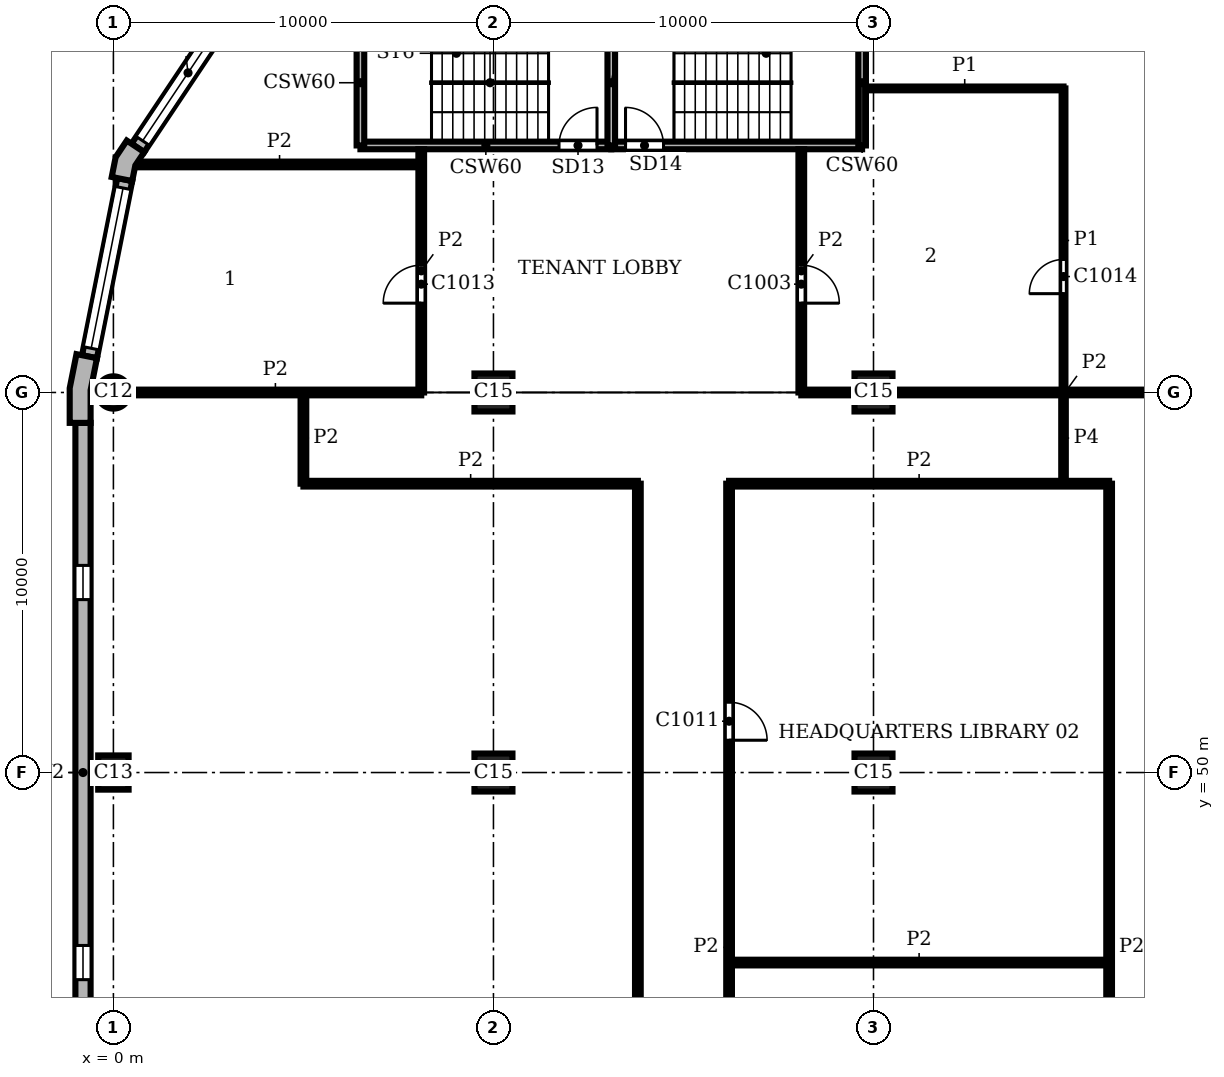
"""IFC4 building model, lengths in metres.
Left out: names, types, materials, properties, quantities, classifications, styles, units other than length and angle.
Written with IfcOpenShell. Run it as: python <this file> out.ifc"""

import sys

from ifc_helpers import new_model, si_unit, direction, frame, frame_2d, origin, origin_2d, place, context, subcontext, project, spatial, polyline, rectangle, circle, outline, extrude, element, fill, save


model = new_model("IFC4")
c1 = context("Model", 3, precision=1e-05, world=origin(), true_north=direction((0.0, 1.0)))
c2 = subcontext(c1, "Body", "Model", "MODEL_VIEW")
j1 = project(units=[si_unit("LENGTHUNIT", "METRE"), si_unit("PLANEANGLEUNIT", "RADIAN")], contexts=[c1])
p1 = place(None, origin())
s1 = spatial("IfcSite", under=j1, at=p1, CompositionType="ELEMENT")
p2 = place(p1, origin())
s2 = spatial("IfcBuilding", under=s1, at=p2, CompositionType="ELEMENT")
p3 = place(p2, frame((0.0, 0.0, 348.9)))
s3 = spatial("IfcBuildingStorey", under=s2, at=p3, CompositionType="ELEMENT", Elevation=348.9)
p4 = place(p3, frame((0.0, 60.0, 0.0), z_axis=(0.0, 0.0, 1.0), x_axis=(1.0, 0.0, 0.0)))
e1 = element("IfcColumn", 1, at=p4, inside=s3, PredefinedType="COLUMN", context=c2, shape_type="SweptSolid", body=[
    extrude(circle(Radius=0.425, at=origin_2d()), origin(), (0.0, 0.0, 1.0), 3.9),
])
p5 = place(p3, frame((0.0, 50.0, 0.0), z_axis=(0.0, 0.0, 1.0), x_axis=(0.0, 1.0, 0.0)))
e2 = element("IfcColumn", 2, at=p5, inside=s3, PredefinedType="COLUMN", context=c2, shape_type="SweptSolid", body=[
    extrude(rectangle(XDim=0.9, YDim=0.8, at=origin_2d()), origin(), (0.0, 0.0, 1.0), 3.9),
])
for number, where, z_axis, x_axis in (
    (3, (10.0, 50.0, 0.0), (0.0, 0.0, 1.0), (1.0, 0.0, 0.0)),
    (4, (10.0, 60.0, 0.0), (0.0, 0.0, 1.0), (1.0, 0.0, 0.0)),
    (5, (20.0, 50.0, 0.0), (0.0, 0.0, 1.0), (1.0, 0.0, 0.0)),
    (6, (20.0, 60.0, 0.0), (0.0, 0.0, 1.0), (1.0, 0.0, 0.0)),
):
    element("IfcColumn", number, at=place(p3, frame(where, z_axis=z_axis, x_axis=x_axis)), inside=s3, PredefinedType="COLUMN", context=c2, shape_type="SweptSolid", body=[
        extrude(rectangle(XDim=1.0, YDim=1.0, at=origin_2d()), origin(), (0.0, 0.0, 1.0), 3.9),
    ])
p6 = place(p3, origin())
e7 = element("IfcWall", 7, at=p6, inside=s3, PredefinedType="SOLIDWALL", context=c2, shape_type="SweptSolid", body=[
    extrude(outline(polyline([(0.477, 66.545), (0.352, 66.629), (0.059, 66.189), (-0.045, 65.67), (0.103, 65.641), (0.495, 65.563), (0.577, 65.974), (0.81, 66.323), (0.477, 66.545)])), origin(), (0.0, 0.0, 1.0), 3.9),
])
e8 = element("IfcWall", 8, at=p6, inside=s3, PredefinedType="SOLIDWALL", context=c2, shape_type="SweptSolid", body=[
    extrude(outline(polyline([(-0.825, 60.98), (-0.972, 61.009), (-1.15, 60.113), (-1.15, 59.2), (-1.0, 59.2), (-0.6, 59.2), (-0.6, 60.059), (-0.432, 60.902), (-0.825, 60.98)])), origin(), (0.0, 0.0, 1.0), 3.9),
])
p7 = place(p3, frame((29.357, 66.434, 0.0), z_axis=(0.0, 0.0, 1.0), x_axis=(-0.555541552266, 0.831488775454, 0.0)))
e9 = element("IfcWall", 9, at=p7, inside=s3, PredefinedType="SOLIDWALL", context=c2, shape_type="SweptSolid", body=[
    extrude(rectangle(XDim=4.753, YDim=0.4, at=frame_2d((2.376, 0.0))), origin(), (0.0, 0.0, 1.0), 3.9),
])
p8 = place(p7, frame((0.226, 0.0, 0.9)))
e10 = element("IfcOpeningElement", 10, at=p8, cuts=e9, PredefinedType="OPENING", context=c2, shape_type="SweptSolid", body=[
    extrude(rectangle(XDim=4.3, YDim=2.35, at=frame_2d((2.15, 1.175))), frame((0.0, 0.21, 0.0), z_axis=(0.0, -1.0, 0.0), x_axis=(1.0, 0.0, 0.0)), (0.0, 0.0, 1.0), 0.42),
])
p9 = place(p3, frame((3.284, 70.386, 0.0), z_axis=(0.0, 0.0, 1.0), x_axis=(-0.555541552266, -0.831488775454, 0.0)))
e11 = element("IfcWall", 11, at=p9, inside=s3, PredefinedType="SOLIDWALL", context=c2, shape_type="SweptSolid", body=[
    extrude(rectangle(XDim=4.753, YDim=0.4, at=frame_2d((2.376, 0.0))), origin(), (0.0, 0.0, 1.0), 3.9),
])
p10 = place(p9, frame((0.226, 0.0, 0.9)))
e12 = element("IfcOpeningElement", 12, at=p10, cuts=e11, PredefinedType="OPENING", context=c2, shape_type="SweptSolid", body=[
    extrude(rectangle(XDim=4.3, YDim=2.35, at=frame_2d((2.15, 1.175))), frame((0.0, 0.21, 0.0), z_axis=(0.0, -1.0, 0.0), x_axis=(1.0, 0.0, 0.0)), (0.0, 0.0, 1.0), 0.42),
])
p11 = place(p3, frame((0.299, 65.602, 0.0), z_axis=(0.0, 0.0, 1.0), x_axis=(-0.195098533057, -0.98078364709, 0.0)))
e13 = element("IfcWall", 13, at=p11, inside=s3, PredefinedType="SOLIDWALL", context=c2, shape_type="SweptSolid", body=[
    extrude(rectangle(XDim=4.753, YDim=0.4, at=frame_2d((2.376, 0.0))), origin(), (0.0, 0.0, 1.0), 3.9),
])
p12 = place(p11, frame((0.226, 0.0, 0.9)))
e14 = element("IfcOpeningElement", 14, at=p12, cuts=e13, PredefinedType="OPENING", context=c2, shape_type="SweptSolid", body=[
    extrude(rectangle(XDim=4.3, YDim=2.35, at=frame_2d((2.15, 1.175))), frame((0.0, 0.21, 0.0), z_axis=(0.0, -1.0, 0.0), x_axis=(1.0, 0.0, 0.0)), (0.0, 0.0, 1.0), 0.42),
])
p13 = place(p3, frame((-0.8, 59.2, 0.0), z_axis=(0.0, 0.0, 1.0), x_axis=(0.0, -1.0, 0.0)))
e15 = element("IfcWall", 15, at=p13, inside=s3, PredefinedType="SOLIDWALL", context=c2, shape_type="SweptSolid", body=[
    extrude(rectangle(XDim=18.4, YDim=0.4, at=frame_2d((9.2, 0.0))), origin(), (0.0, 0.0, 1.0), 3.9),
])
p14 = place(p13, frame((3.75, 0.0, 0.9)))
e16 = element("IfcOpeningElement", 16, at=p14, cuts=e15, PredefinedType="OPENING", context=c2, shape_type="SweptSolid", body=[
    extrude(rectangle(XDim=0.9, YDim=2.35, at=frame_2d((0.45, 1.175))), frame((0.0, 0.21, 0.0), z_axis=(0.0, -1.0, 0.0), x_axis=(1.0, 0.0, 0.0)), (0.0, 0.0, 1.0), 0.42),
])
p15 = place(p13, frame((13.75, 0.0, 0.9)))
e17 = element("IfcOpeningElement", 17, at=p15, cuts=e15, PredefinedType="OPENING", context=c2, shape_type="SweptSolid", body=[
    extrude(rectangle(XDim=0.9, YDim=2.35, at=frame_2d((0.45, 1.175))), frame((0.0, 0.21, 0.0), z_axis=(0.0, -1.0, 0.0), x_axis=(1.0, 0.0, 0.0)), (0.0, 0.0, 1.0), 0.42),
])
p16 = place(p3, frame((6.5, 66.5, 0.0), z_axis=(0.0, 0.0, 1.0), x_axis=(1.0, 0.0, 0.0)))
e18 = element("IfcWall", 18, at=p16, inside=s3, PredefinedType="SHEAR", context=c2, shape_type="SweptSolid", body=[
    extrude(rectangle(XDim=6.6, YDim=0.2, at=frame_2d((3.3, 0.0))), origin(), (0.0, 0.0, 1.0), 3.45),
])
p17 = place(p16, frame((5.225, 0.0, 0.0)))
e19 = element("IfcOpeningElement", 19, at=p17, cuts=e18, PredefinedType="OPENING", context=c2, shape_type="SweptSolid", body=[
    extrude(rectangle(XDim=1.0, YDim=2.1, at=frame_2d((0.5, 1.05))), frame((0.0, 0.11, 0.0), z_axis=(0.0, -1.0, 0.0), x_axis=(1.0, 0.0, 0.0)), (0.0, 0.0, 1.0), 0.22),
])
p18 = place(p3, frame((13.1, 66.5, 0.0), z_axis=(0.0, 0.0, 1.0), x_axis=(1.0, 0.0, 0.0)))
e20 = element("IfcWall", 20, at=p18, inside=s3, PredefinedType="SHEAR", context=c2, shape_type="SweptSolid", body=[
    extrude(rectangle(XDim=6.6, YDim=0.2, at=frame_2d((3.3, 0.0))), origin(), (0.0, 0.0, 1.0), 3.45),
])
p19 = place(p18, frame((0.375, 0.0, 0.0)))
e21 = element("IfcOpeningElement", 21, at=p19, cuts=e20, PredefinedType="OPENING", context=c2, shape_type="SweptSolid", body=[
    extrude(rectangle(XDim=1.0, YDim=2.1, at=frame_2d((0.5, 1.05))), frame((0.0, 0.11, 0.0), z_axis=(0.0, -1.0, 0.0), x_axis=(1.0, 0.0, 0.0)), (0.0, 0.0, 1.0), 0.22),
])
for number, where, z_axis, x_axis in (
    (22, (6.5, 66.5, 0.0), (0.0, 0.0, 1.0), (0.0, 1.0, 0.0)),
    (23, (13.1, 66.5, 0.0), (0.0, 0.0, 1.0), (0.0, 1.0, 0.0)),
    (24, (19.7, 66.5, 0.0), (0.0, 0.0, 1.0), (0.0, 1.0, 0.0)),
):
    element("IfcWall", number, at=place(p3, frame(where, z_axis=z_axis, x_axis=x_axis)), inside=s3, PredefinedType="SHEAR", context=c2, shape_type="SweptSolid", body=[
        extrude(rectangle(XDim=3.3, YDim=0.2, at=frame_2d((1.65, 0.0))), origin(), (0.0, 0.0, 1.0), 3.45),
    ])
p20 = place(p3, frame((25.0, 60.0, 0.0), z_axis=(0.0, 0.0, 1.0), x_axis=(0.0, 1.0, 0.0)))
e25 = element("IfcWall", 25, at=p20, inside=s3, PredefinedType="PARTITIONING", context=c2, shape_type="SweptSolid", body=[
    extrude(rectangle(XDim=8.0, YDim=0.1, at=frame_2d((4.0, 0.0))), origin(), (0.0, 0.0, 1.0), 3.45),
])
p21 = place(p20, frame((2.6, 0.0, 0.0)))
e26 = element("IfcOpeningElement", 26, at=p21, cuts=e25, PredefinedType="OPENING", context=c2, shape_type="SweptSolid", body=[
    extrude(rectangle(XDim=0.9, YDim=2.1, at=frame_2d((0.45, 1.05))), frame((0.0, 0.06, 0.0), z_axis=(0.0, -1.0, 0.0), x_axis=(1.0, 0.0, 0.0)), (0.0, 0.0, 1.0), 0.12),
])
p22 = place(p3, frame((19.8, 68.0, 0.0), z_axis=(0.0, 0.0, 1.0), x_axis=(1.0, 0.0, 0.0)))
e27 = element("IfcWall", 27, at=p22, inside=s3, PredefinedType="PARTITIONING", context=c2, shape_type="SweptSolid", body=[
    extrude(rectangle(XDim=5.2, YDim=0.1, at=frame_2d((2.6, 0.0))), origin(), (0.0, 0.0, 1.0), 3.45),
])
p23 = place(p3, frame((5.0, 57.6, 0.0), z_axis=(0.0, 0.0, 1.0), x_axis=(0.0, 1.0, 0.0)))
e28 = element("IfcWall", 28, at=p23, inside=s3, PredefinedType="PARTITIONING", context=c2, shape_type="SweptSolid", body=[
    extrude(rectangle(XDim=2.4, YDim=0.15, at=frame_2d((1.2, 0.0))), origin(), (0.0, 0.0, 1.0), 3.45),
])
p24 = place(p3, frame((8.1, 60.0, 0.0), z_axis=(0.0, 0.0, 1.0), x_axis=(0.0, 1.0, 0.0)))
e29 = element("IfcWall", 29, at=p24, inside=s3, PredefinedType="PARTITIONING", context=c2, shape_type="SweptSolid", body=[
    extrude(rectangle(XDim=6.4, YDim=0.15, at=frame_2d((3.2, 0.0))), origin(), (0.0, 0.0, 1.0), 3.45),
])
p25 = place(p24, frame((2.35, 0.0, 0.0)))
e30 = element("IfcOpeningElement", 30, at=p25, cuts=e29, PredefinedType="OPENING", context=c2, shape_type="SweptSolid", body=[
    extrude(rectangle(XDim=1.0, YDim=2.1, at=frame_2d((0.5, 1.05))), frame((0.0, 0.085, 0.0), z_axis=(0.0, -1.0, 0.0), x_axis=(1.0, 0.0, 0.0)), (0.0, 0.0, 1.0), 0.17),
])
p26 = place(p3, frame((13.8, 28.0, 0.0), z_axis=(0.0, 0.0, 1.0), x_axis=(0.0, 1.0, 0.0)))
e31 = element("IfcWall", 31, at=p26, inside=s3, PredefinedType="PARTITIONING", context=c2, shape_type="SweptSolid", body=[
    extrude(rectangle(XDim=29.6, YDim=0.15, at=frame_2d((14.8, 0.0))), origin(), (0.0, 0.0, 1.0), 3.45),
])
p27 = place(p26, frame((13.901, 0.0, 0.0)))
e32 = element("IfcOpeningElement", 32, at=p27, cuts=e31, PredefinedType="OPENING", context=c2, shape_type="SweptSolid", body=[
    extrude(rectangle(XDim=1.8, YDim=2.1, at=frame_2d((0.9, 1.05))), frame((0.0, 0.085, 0.0), z_axis=(0.0, -1.0, 0.0), x_axis=(1.0, 0.0, 0.0)), (0.0, 0.0, 1.0), 0.17),
])
p28 = place(p3, frame((16.2, 33.2, 0.0), z_axis=(0.0, 0.0, 1.0), x_axis=(0.0, 1.0, 0.0)))
e33 = element("IfcWall", 33, at=p28, inside=s3, PredefinedType="PARTITIONING", context=c2, shape_type="SweptSolid", body=[
    extrude(rectangle(XDim=24.4, YDim=0.15, at=frame_2d((12.2, 0.0))), origin(), (0.0, 0.0, 1.0), 3.45),
])
p29 = place(p28, frame((5.1, 0.0, 0.0)))
e34 = element("IfcOpeningElement", 34, at=p29, cuts=e33, PredefinedType="OPENING", context=c2, shape_type="SweptSolid", body=[
    extrude(rectangle(XDim=1.0, YDim=2.1, at=frame_2d((0.5, 1.05))), frame((0.0, 0.085, 0.0), z_axis=(0.0, -1.0, 0.0), x_axis=(1.0, 0.0, 0.0)), (0.0, 0.0, 1.0), 0.17),
])
p30 = place(p28, frame((17.65, 0.0, 0.0)))
e35 = element("IfcOpeningElement", 35, at=p30, cuts=e33, PredefinedType="OPENING", context=c2, shape_type="SweptSolid", body=[
    extrude(rectangle(XDim=1.0, YDim=2.1, at=frame_2d((0.5, 1.05))), frame((0.0, 0.085, 0.0), z_axis=(0.0, -1.0, 0.0), x_axis=(1.0, 0.0, 0.0)), (0.0, 0.0, 1.0), 0.17),
])
p31 = place(p3, frame((18.1, 60.0, 0.0), z_axis=(0.0, 0.0, 1.0), x_axis=(0.0, 1.0, 0.0)))
e36 = element("IfcWall", 36, at=p31, inside=s3, PredefinedType="PARTITIONING", context=c2, shape_type="SweptSolid", body=[
    extrude(rectangle(XDim=6.4, YDim=0.15, at=frame_2d((3.2, 0.0))), origin(), (0.0, 0.0, 1.0), 3.45),
])
p32 = place(p31, frame((2.35, 0.0, 0.0)))
e37 = element("IfcOpeningElement", 37, at=p32, cuts=e36, PredefinedType="OPENING", context=c2, shape_type="SweptSolid", body=[
    extrude(rectangle(XDim=1.0, YDim=2.1, at=frame_2d((0.5, 1.05))), frame((0.0, 0.085, 0.0), z_axis=(0.0, -1.0, 0.0), x_axis=(1.0, 0.0, 0.0)), (0.0, 0.0, 1.0), 0.17),
])
p33 = place(p3, frame((26.2, 33.2, 0.0), z_axis=(0.0, 0.0, 1.0), x_axis=(0.0, 1.0, 0.0)))
e38 = element("IfcWall", 38, at=p33, inside=s3, PredefinedType="PARTITIONING", context=c2, shape_type="SweptSolid", body=[
    extrude(rectangle(XDim=24.4, YDim=0.15, at=frame_2d((12.2, 0.0))), origin(), (0.0, 0.0, 1.0), 3.45),
])
p34 = place(p3, frame((16.2, 45.0, 0.0), z_axis=(0.0, 0.0, 1.0), x_axis=(1.0, 0.0, 0.0)))
e39 = element("IfcWall", 39, at=p34, inside=s3, PredefinedType="PARTITIONING", context=c2, shape_type="SweptSolid", body=[
    extrude(rectangle(XDim=10.0, YDim=0.15, at=frame_2d((5.0, 0.0))), origin(), (0.0, 0.0, 1.0), 3.45),
])
p35 = place(p3, frame((5.0, 57.6, 0.0), z_axis=(0.0, 0.0, 1.0), x_axis=(1.0, 0.0, 0.0)))
e40 = element("IfcWall", 40, at=p35, inside=s3, PredefinedType="PARTITIONING", context=c2, shape_type="SweptSolid", body=[
    extrude(rectangle(XDim=8.8, YDim=0.15, at=frame_2d((4.4, 0.0))), origin(), (0.0, 0.0, 1.0), 3.45),
])
p36 = place(p3, frame((16.2, 57.6, 0.0), z_axis=(0.0, 0.0, 1.0), x_axis=(1.0, 0.0, 0.0)))
e41 = element("IfcWall", 41, at=p36, inside=s3, PredefinedType="PARTITIONING", context=c2, shape_type="SweptSolid", body=[
    extrude(rectangle(XDim=10.0, YDim=0.15, at=frame_2d((5.0, 0.0))), origin(), (0.0, 0.0, 1.0), 3.45),
])
p37 = place(p3, frame((0.425, 60.0, 0.0), z_axis=(0.0, 0.0, 1.0), x_axis=(1.0, 0.0, 0.0)))
e42 = element("IfcWall", 42, at=p37, inside=s3, PredefinedType="PARTITIONING", context=c2, shape_type="SweptSolid", body=[
    extrude(rectangle(XDim=7.675, YDim=0.15, at=frame_2d((3.837, 0.0))), origin(), (0.0, 0.0, 1.0), 3.45),
])
p38 = place(p3, frame((18.1, 60.0, 0.0), z_axis=(0.0, 0.0, 1.0), x_axis=(1.0, 0.0, 0.0)))
e43 = element("IfcWall", 43, at=p38, inside=s3, PredefinedType="PARTITIONING", context=c2, shape_type="SweptSolid", body=[
    extrude(rectangle(XDim=1.4, YDim=0.15, at=frame_2d((0.7, 0.0))), origin(), (0.0, 0.0, 1.0), 3.45),
])
p39 = place(p3, frame((20.5, 60.0, 0.0), z_axis=(0.0, 0.0, 1.0), x_axis=(1.0, 0.0, 0.0)))
e44 = element("IfcWall", 44, at=p39, inside=s3, PredefinedType="PARTITIONING", context=c2, shape_type="SweptSolid", body=[
    extrude(rectangle(XDim=9.075, YDim=0.15, at=frame_2d((4.538, 0.0))), origin(), (0.0, 0.0, 1.0), 3.45),
])
p40 = place(p3, frame((0.644, 66.0, 0.0), z_axis=(0.0, 0.0, 1.0), x_axis=(1.0, 0.0, 0.0)))
e45 = element("IfcWall", 45, at=p40, inside=s3, PredefinedType="PARTITIONING", context=c2, shape_type="SweptSolid", body=[
    extrude(rectangle(XDim=7.456, YDim=0.15, at=frame_2d((3.728, 0.0))), origin(), (0.0, 0.0, 1.0), 3.45),
])
p41 = place(p3, frame((25.0, 57.6, 0.0), z_axis=(0.0, 0.0, 1.0), x_axis=(0.0, 1.0, 0.0)))
e46 = element("IfcWall", 46, at=p41, inside=s3, PredefinedType="PARTITIONING", context=c2, shape_type="SweptSolid", body=[
    extrude(rectangle(XDim=2.4, YDim=0.12, at=frame_2d((1.2, 0.0))), origin(), (0.0, 0.0, 1.0), 3.45),
])
p42 = place(p8, origin())
e47 = element("IfcWindow", 47, at=p42, inside=s3, PartitioningType="SINGLE_PANEL", PredefinedType="WINDOW", context=c2, shape_type="SweptSolid", body=[
    extrude(rectangle(XDim=4.3, YDim=2.35, at=frame_2d((2.15, 1.175))), frame((0.0, 0.16, 0.0), z_axis=(0.0, -1.0, 0.0), x_axis=(1.0, 0.0, 0.0)), (0.0, 0.0, 1.0), 0.06),
])
fill(e10, e47)
p43 = place(p10, origin())
e48 = element("IfcWindow", 48, at=p43, inside=s3, PartitioningType="SINGLE_PANEL", PredefinedType="WINDOW", context=c2, shape_type="SweptSolid", body=[
    extrude(rectangle(XDim=4.3, YDim=2.35, at=frame_2d((2.15, 1.175))), frame((0.0, 0.16, 0.0), z_axis=(0.0, -1.0, 0.0), x_axis=(1.0, 0.0, 0.0)), (0.0, 0.0, 1.0), 0.06),
])
fill(e12, e48)
p44 = place(p12, origin())
e49 = element("IfcWindow", 49, at=p44, inside=s3, PartitioningType="SINGLE_PANEL", PredefinedType="WINDOW", context=c2, shape_type="SweptSolid", body=[
    extrude(rectangle(XDim=4.3, YDim=2.35, at=frame_2d((2.15, 1.175))), frame((0.0, 0.16, 0.0), z_axis=(0.0, -1.0, 0.0), x_axis=(1.0, 0.0, 0.0)), (0.0, 0.0, 1.0), 0.06),
])
fill(e14, e49)
p45 = place(p14, origin())
e50 = element("IfcWindow", 50, at=p45, inside=s3, PartitioningType="SINGLE_PANEL", PredefinedType="WINDOW", context=c2, shape_type="SweptSolid", body=[
    extrude(rectangle(XDim=0.9, YDim=2.35, at=frame_2d((0.45, 1.175))), frame((0.0, 0.16, 0.0), z_axis=(0.0, -1.0, 0.0), x_axis=(1.0, 0.0, 0.0)), (0.0, 0.0, 1.0), 0.06),
])
fill(e16, e50)
p46 = place(p15, origin())
e51 = element("IfcWindow", 51, at=p46, inside=s3, PartitioningType="SINGLE_PANEL", PredefinedType="WINDOW", context=c2, shape_type="SweptSolid", body=[
    extrude(rectangle(XDim=0.9, YDim=2.35, at=frame_2d((0.45, 1.175))), frame((0.0, 0.16, 0.0), z_axis=(0.0, -1.0, 0.0), x_axis=(1.0, 0.0, 0.0)), (0.0, 0.0, 1.0), 0.06),
])
fill(e17, e51)
p47 = place(p17, origin())
e52 = element("IfcDoor", 52, at=p47, inside=s3, OperationType="SINGLE_SWING_RIGHT", PredefinedType="DOOR", context=c2, shape_type="SweptSolid", body=[
    extrude(rectangle(XDim=1.0, YDim=2.1, at=frame_2d((0.5, 1.05))), frame((0.0, 0.025, 0.0), z_axis=(0.0, -1.0, 0.0), x_axis=(1.0, 0.0, 0.0)), (0.0, 0.0, 1.0), 0.05),
])
fill(e19, e52)
p48 = place(p19, origin())
e53 = element("IfcDoor", 53, at=p48, inside=s3, OperationType="SINGLE_SWING_LEFT", PredefinedType="DOOR", context=c2, shape_type="SweptSolid", body=[
    extrude(rectangle(XDim=1.0, YDim=2.1, at=frame_2d((0.5, 1.05))), frame((0.0, 0.025, 0.0), z_axis=(0.0, -1.0, 0.0), x_axis=(1.0, 0.0, 0.0)), (0.0, 0.0, 1.0), 0.05),
])
fill(e21, e53)
p49 = place(p32, frame((1.0, 0.0, 0.0), z_axis=(0.0, 0.0, 1.0), x_axis=(-1.0, 0.0, 0.0)))
e54 = element("IfcDoor", 54, at=p49, inside=s3, OperationType="SINGLE_SWING_RIGHT", PredefinedType="DOOR", context=c2, shape_type="SweptSolid", body=[
    extrude(rectangle(XDim=1.0, YDim=2.1, at=frame_2d((0.5, 1.05))), frame((0.0, 0.025, 0.0), z_axis=(0.0, -1.0, 0.0), x_axis=(1.0, 0.0, 0.0)), (0.0, 0.0, 1.0), 0.05),
])
fill(e37, e54)
p50 = place(p30, frame((1.0, 0.0, 0.0), z_axis=(0.0, 0.0, 1.0), x_axis=(-1.0, 0.0, 0.0)))
e55 = element("IfcDoor", 55, at=p50, inside=s3, OperationType="SINGLE_SWING_RIGHT", PredefinedType="DOOR", context=c2, shape_type="SweptSolid", body=[
    extrude(rectangle(XDim=1.0, YDim=2.1, at=frame_2d((0.5, 1.05))), frame((0.0, 0.025, 0.0), z_axis=(0.0, -1.0, 0.0), x_axis=(1.0, 0.0, 0.0)), (0.0, 0.0, 1.0), 0.05),
])
fill(e35, e55)
p51 = place(p25, origin())
e56 = element("IfcDoor", 56, at=p51, inside=s3, OperationType="SINGLE_SWING_LEFT", PredefinedType="DOOR", context=c2, shape_type="SweptSolid", body=[
    extrude(rectangle(XDim=1.0, YDim=2.1, at=frame_2d((0.5, 1.05))), frame((0.0, 0.025, 0.0), z_axis=(0.0, -1.0, 0.0), x_axis=(1.0, 0.0, 0.0)), (0.0, 0.0, 1.0), 0.05),
])
fill(e30, e56)
p52 = place(p21, origin())
e57 = element("IfcDoor", 57, at=p52, inside=s3, OperationType="SINGLE_SWING_LEFT", PredefinedType="DOOR", context=c2, shape_type="SweptSolid", body=[
    extrude(rectangle(XDim=0.9, YDim=2.1, at=frame_2d((0.45, 1.05))), frame((0.0, 0.025, 0.0), z_axis=(0.0, -1.0, 0.0), x_axis=(1.0, 0.0, 0.0)), (0.0, 0.0, 1.0), 0.05),
])
fill(e26, e57)
save(model, sys.argv[1])
